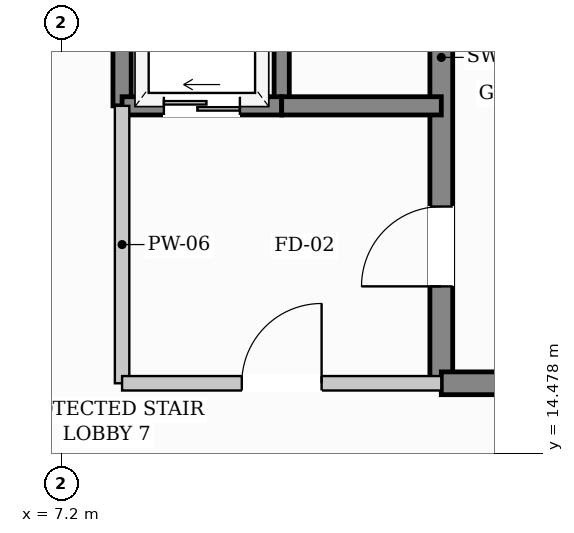
"""IFC4 building model, lengths in metres.
Left out: names, types, materials, properties, quantities, classifications, styles, units other than length and angle.
Written with IfcOpenShell. Run it as: python <this file> out.ifc"""

import sys

from ifc_helpers import new_model, si_unit, direction, frame, frame_2d, origin, place, context, subcontext, project, spatial, rectangle, extrude, element, fill, save


model = new_model("IFC4")
c1 = context("Model", 3, precision=1e-05, world=origin(), true_north=direction((0.0, 1.0)))
c2 = subcontext(c1, "Body", "Model", "MODEL_VIEW")
j1 = project(units=[si_unit("LENGTHUNIT", "METRE"), si_unit("PLANEANGLEUNIT", "RADIAN")], contexts=[c1])
p1 = place(None, origin())
s1 = spatial("IfcSite", under=j1, at=p1, CompositionType="ELEMENT")
p2 = place(p1, origin())
s2 = spatial("IfcBuilding", under=s1, at=p2, CompositionType="ELEMENT")
p3 = place(p2, frame((0.0, 0.0, 13.2)))
s3 = spatial("IfcBuildingStorey", under=s2, at=p3, CompositionType="ELEMENT", Elevation=13.2)
p4 = place(p3, frame((12.2, 15.4, 0.0), z_axis=(0.0, 0.0, 1.0), x_axis=(0.0, 1.0, 0.0)))
e1 = element("IfcWall", 1, at=p4, inside=s3, PredefinedType="SHEAR", context=c2, shape_type="SweptSolid", body=[
    extrude(rectangle(XDim=6.0, YDim=0.3, at=frame_2d((3.0, 0.0))), origin(), (0.0, 0.0, 1.0), 3.44),
])
p5 = place(p4, frame((1.275, 0.0, 0.0)))
e2 = element("IfcOpeningElement", 2, at=p5, cuts=e1, PredefinedType="OPENING", context=c2, shape_type="SweptSolid", body=[
    extrude(rectangle(XDim=1.05, YDim=2.15, at=frame_2d((0.525, 1.075))), frame((0.0, 0.16, 0.0), z_axis=(0.0, -1.0, 0.0), x_axis=(1.0, 0.0, 0.0)), (0.0, 0.0, 1.0), 0.32),
])
p6 = place(p3, frame((12.2, 15.4, 0.0), z_axis=(0.0, 0.0, 1.0), x_axis=(1.0, 0.0, 0.0)))
e3 = element("IfcWall", 3, at=p6, inside=s3, PredefinedType="SHEAR", context=c2, shape_type="SweptSolid", body=[
    extrude(rectangle(XDim=7.0, YDim=0.3, at=frame_2d((3.5, 0.0))), origin(), (0.0, 0.0, 1.0), 3.44),
])
p7 = place(p3, frame((8.0, 19.05, 0.0), z_axis=(0.0, 0.0, 1.0), x_axis=(0.0, 1.0, 0.0)))
e4 = element("IfcWall", 4, at=p7, inside=s3, PredefinedType="SHEAR", context=c2, shape_type="SweptSolid", body=[
    extrude(rectangle(XDim=2.35, YDim=0.24, at=frame_2d((1.175, 0.0))), origin(), (0.0, 0.0, 1.0), 3.44),
])
p8 = place(p3, frame((10.1, 19.05, 0.0), z_axis=(0.0, 0.0, 1.0), x_axis=(0.0, 1.0, 0.0)))
e5 = element("IfcWall", 5, at=p8, inside=s3, PredefinedType="SHEAR", context=c2, shape_type="SweptSolid", body=[
    extrude(rectangle(XDim=2.35, YDim=0.2, at=frame_2d((1.175, 0.0))), origin(), (0.0, 0.0, 1.0), 3.44),
])
p9 = place(p3, frame((8.0, 19.05, 0.0), z_axis=(0.0, 0.0, 1.0), x_axis=(1.0, 0.0, 0.0)))
e6 = element("IfcWall", 6, at=p9, inside=s3, PredefinedType="SHEAR", context=c2, shape_type="SweptSolid", body=[
    extrude(rectangle(XDim=2.1, YDim=0.24, at=frame_2d((1.05, 0.0))), origin(), (0.0, 0.0, 1.0), 3.44),
])
p10 = place(p9, frame((0.55, 0.0, 0.0)))
e7 = element("IfcOpeningElement", 7, at=p10, cuts=e6, PredefinedType="OPENING", context=c2, shape_type="SweptSolid", body=[
    extrude(rectangle(XDim=1.0, YDim=2.1, at=frame_2d((0.5, 1.05))), frame((0.0, 0.13, 0.0), z_axis=(0.0, -1.0, 0.0), x_axis=(1.0, 0.0, 0.0)), (0.0, 0.0, 1.0), 0.26),
])
p11 = place(p3, frame((10.1, 19.05, 0.0), z_axis=(0.0, 0.0, 1.0), x_axis=(1.0, 0.0, 0.0)))
e8 = element("IfcWall", 8, at=p11, inside=s3, PredefinedType="SHEAR", context=c2, shape_type="SweptSolid", body=[
    extrude(rectangle(XDim=2.1, YDim=0.24, at=frame_2d((1.05, 0.0))), origin(), (0.0, 0.0, 1.0), 3.44),
])
p12 = place(p3, frame((8.0, 15.4, 0.0), z_axis=(0.0, 0.0, 1.0), x_axis=(0.0, 1.0, 0.0)))
e9 = element("IfcWall", 9, at=p12, inside=s3, PredefinedType="PARTITIONING", context=c2, shape_type="SweptSolid", body=[
    extrude(rectangle(XDim=3.65, YDim=0.19, at=frame_2d((1.825, 0.0))), origin(), (0.0, 0.0, 1.0), 3.44),
])
p13 = place(p3, frame((8.0, 15.4, 0.0), z_axis=(0.0, 0.0, 1.0), x_axis=(1.0, 0.0, 0.0)))
e10 = element("IfcWall", 10, at=p13, inside=s3, PredefinedType="PARTITIONING", context=c2, shape_type="SweptSolid", body=[
    extrude(rectangle(XDim=4.2, YDim=0.19, at=frame_2d((2.1, 0.0))), origin(), (0.0, 0.0, 1.0), 3.44),
])
p14 = place(p13, frame((1.575, 0.0, 0.0)))
e11 = element("IfcOpeningElement", 11, at=p14, cuts=e10, PredefinedType="OPENING", context=c2, shape_type="SweptSolid", body=[
    extrude(rectangle(XDim=1.05, YDim=2.15, at=frame_2d((0.525, 1.075))), frame((0.0, 0.105, 0.0), z_axis=(0.0, -1.0, 0.0), x_axis=(1.0, 0.0, 0.0)), (0.0, 0.0, 1.0), 0.21),
])
p15 = place(p5, origin())
e12 = element("IfcDoor", 12, at=p15, inside=s3, OperationType="SINGLE_SWING_LEFT", PredefinedType="DOOR", context=c2, shape_type="SweptSolid", body=[
    extrude(rectangle(XDim=1.05, YDim=2.15, at=frame_2d((0.525, 1.075))), frame((0.0, 0.025, 0.0), z_axis=(0.0, -1.0, 0.0), x_axis=(1.0, 0.0, 0.0)), (0.0, 0.0, 1.0), 0.05),
])
fill(e2, e12)
p16 = place(p10, origin())
e13 = element("IfcDoor", 13, at=p16, inside=s3, OperationType="SLIDING_TO_LEFT", PredefinedType="DOOR", context=c2, shape_type="SweptSolid", body=[
    extrude(rectangle(XDim=1.0, YDim=2.1, at=frame_2d((0.5, 1.05))), frame((0.0, 0.025, 0.0), z_axis=(0.0, -1.0, 0.0), x_axis=(1.0, 0.0, 0.0)), (0.0, 0.0, 1.0), 0.05),
])
fill(e7, e13)
p17 = place(p14, origin())
e14 = element("IfcDoor", 14, at=p17, inside=s3, OperationType="SINGLE_SWING_RIGHT", PredefinedType="DOOR", context=c2, shape_type="SweptSolid", body=[
    extrude(rectangle(XDim=1.05, YDim=2.15, at=frame_2d((0.525, 1.075))), frame((0.0, 0.025, 0.0), z_axis=(0.0, -1.0, 0.0), x_axis=(1.0, 0.0, 0.0)), (0.0, 0.0, 1.0), 0.05),
])
fill(e11, e14)
save(model, sys.argv[1])
